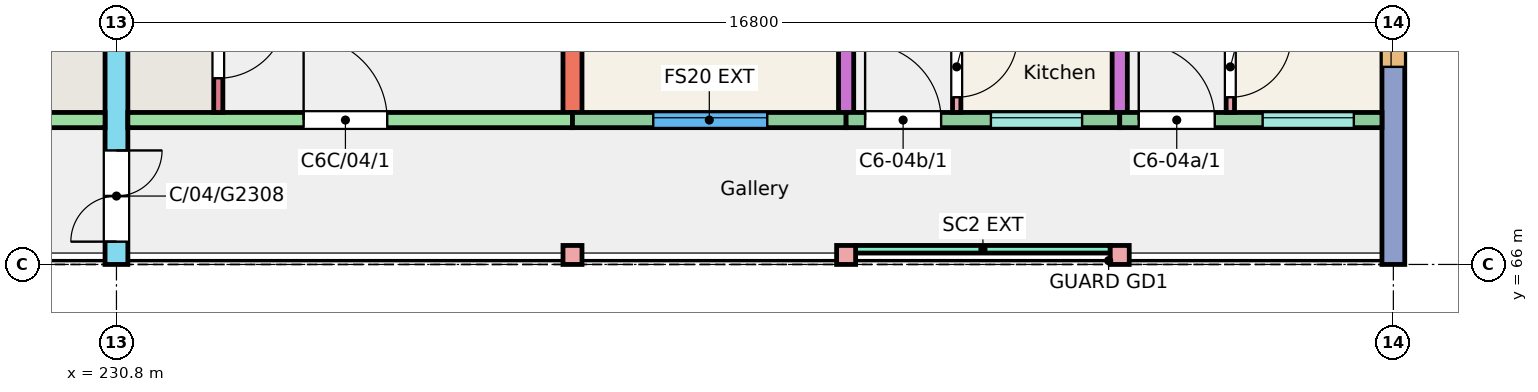
"""IFC4 building model, lengths in metres.
Left out: names, types, materials, properties, quantities, classifications, styles, units other than length and angle.
Written with IfcOpenShell. Run it as: python <this file> out.ifc"""

import sys

from ifc_helpers import new_model, si_unit, direction, frame, frame_2d, origin, origin_2d, place, context, subcontext, project, spatial, rectangle, extrude, element, fill, save


model = new_model("IFC4")
c1 = context("Model", 3, precision=1e-05, world=origin(), true_north=direction((0.0, 1.0)))
c2 = subcontext(c1, "Body", "Model", "MODEL_VIEW")
j1 = project(units=[si_unit("LENGTHUNIT", "METRE"), si_unit("PLANEANGLEUNIT", "RADIAN")], contexts=[c1])
p1 = place(None, origin())
s1 = spatial("IfcSite", under=j1, at=p1, CompositionType="ELEMENT")
p2 = place(p1, origin())
s2 = spatial("IfcBuilding", under=s1, at=p2, CompositionType="ELEMENT")
p3 = place(p2, frame((0.0, 0.0, 12.0)))
s3 = spatial("IfcBuildingStorey", under=s2, at=p3, CompositionType="ELEMENT", Elevation=12.0)
p4 = place(p3, frame((230.8, 66.0, 0.0), z_axis=(0.0, 0.0, 1.0), x_axis=(0.0, 1.0, 0.0)))
e1 = element("IfcWall", 1, at=p4, inside=s3, PredefinedType="SHEAR", context=c2, shape_type="SweptSolid", body=[
    extrude(rectangle(XDim=11.0, YDim=0.3, at=frame_2d((5.5, 0.0))), origin(), (0.0, 0.0, 1.0), 3.0),
])
p5 = place(p4, frame((0.3, 0.0, 0.0)))
e2 = element("IfcOpeningElement", 2, at=p5, cuts=e1, PredefinedType="OPENING", context=c2, shape_type="SweptSolid", body=[
    extrude(rectangle(XDim=1.2, YDim=2.1, at=frame_2d((0.6, 1.05))), frame((0.0, 0.16, 0.0), z_axis=(0.0, -1.0, 0.0), x_axis=(1.0, 0.0, 0.0)), (0.0, 0.0, 1.0), 0.32),
])
p6 = place(p3, frame((236.8, 68.0, 0.0), z_axis=(0.0, 0.0, 1.0), x_axis=(0.0, 1.0, 0.0)))
e3 = element("IfcWall", 3, at=p6, inside=s3, PredefinedType="SHEAR", context=c2, shape_type="SweptSolid", body=[
    extrude(rectangle(XDim=9.0, YDim=0.25, at=frame_2d((4.5, 0.0))), origin(), (0.0, 0.0, 1.0), 3.0),
])
p7 = place(p3, frame((240.4, 68.0, 0.0), z_axis=(0.0, 0.0, 1.0), x_axis=(0.0, 1.0, 0.0)))
e4 = element("IfcWall", 4, at=p7, inside=s3, PredefinedType="SHEAR", context=c2, shape_type="SweptSolid", body=[
    extrude(rectangle(XDim=9.0, YDim=0.2, at=frame_2d((4.5, 0.0))), origin(), (0.0, 0.0, 1.0), 3.0),
])
p8 = place(p7, frame((2.4, 0.0, 0.0)))
e5 = element("IfcOpeningElement", 5, at=p8, cuts=e4, PredefinedType="OPENING", context=c2, shape_type="SweptSolid", body=[
    extrude(rectangle(XDim=1.2, YDim=2.1, at=frame_2d((0.6, 1.05))), frame((0.0, 0.11, 0.0), z_axis=(0.0, -1.0, 0.0), x_axis=(1.0, 0.0, 0.0)), (0.0, 0.0, 1.0), 0.22),
])
p9 = place(p7, frame((6.4, 0.0, 0.0)))
e6 = element("IfcOpeningElement", 6, at=p9, cuts=e4, PredefinedType="OPENING", context=c2, shape_type="SweptSolid", body=[
    extrude(rectangle(XDim=1.2, YDim=2.1, at=frame_2d((0.6, 1.05))), frame((0.0, 0.11, 0.0), z_axis=(0.0, -1.0, 0.0), x_axis=(1.0, 0.0, 0.0)), (0.0, 0.0, 1.0), 0.22),
])
p10 = place(p3, frame((244.0, 68.0, 0.0), z_axis=(0.0, 0.0, 1.0), x_axis=(0.0, 1.0, 0.0)))
e7 = element("IfcWall", 7, at=p10, inside=s3, PredefinedType="SHEAR", context=c2, shape_type="SweptSolid", body=[
    extrude(rectangle(XDim=9.0, YDim=0.2, at=frame_2d((4.5, 0.0))), origin(), (0.0, 0.0, 1.0), 3.0),
])
p11 = place(p3, frame((247.6, 66.0, 0.0), z_axis=(0.0, 0.0, 1.0), x_axis=(0.0, 1.0, 0.0)))
e8 = element("IfcWall", 8, at=p11, inside=s3, PredefinedType="SHEAR", context=c2, shape_type="SweptSolid", body=[
    extrude(rectangle(XDim=11.0, YDim=0.3, at=frame_2d((5.5, 0.0))), origin(), (0.0, 0.0, 1.0), 3.0),
])
p12 = place(p11, frame((2.6, 0.0, 0.9)))
e9 = element("IfcOpeningElement", 9, at=p12, cuts=e8, PredefinedType="OPENING", context=c2, shape_type="SweptSolid", body=[
    extrude(rectangle(XDim=1.2, YDim=1.5, at=frame_2d((0.6, 0.75))), frame((0.0, 0.16, 0.0), z_axis=(0.0, -1.0, 0.0), x_axis=(1.0, 0.0, 0.0)), (0.0, 0.0, 1.0), 0.32),
])
p13 = place(p11, frame((8.005, 0.0, 0.9)))
e10 = element("IfcOpeningElement", 10, at=p13, cuts=e8, PredefinedType="OPENING", context=c2, shape_type="SweptSolid", body=[
    extrude(rectangle(XDim=1.8, YDim=1.5, at=frame_2d((0.9, 0.75))), frame((0.0, 0.16, 0.0), z_axis=(0.0, -1.0, 0.0), x_axis=(1.0, 0.0, 0.0)), (0.0, 0.0, 1.0), 0.32),
])
p14 = place(p3, frame((224.8, 67.9, 0.0), z_axis=(0.0, 0.0, 1.0), x_axis=(1.0, 0.0, 0.0)))
e11 = element("IfcWall", 11, at=p14, inside=s3, PredefinedType="SHEAR", context=c2, shape_type="SweptSolid", body=[
    extrude(rectangle(XDim=5.85, YDim=0.2, at=frame_2d((2.925, 0.0))), origin(), (0.0, 0.0, 1.0), 3.0),
])
p15 = place(p14, frame((2.438, 0.0, 0.0)))
e12 = element("IfcOpeningElement", 12, at=p15, cuts=e11, PredefinedType="OPENING", context=c2, shape_type="SweptSolid", body=[
    extrude(rectangle(XDim=1.1, YDim=2.1, at=frame_2d((0.55, 1.05))), frame((0.0, 0.11, 0.0), z_axis=(0.0, -1.0, 0.0), x_axis=(1.0, 0.0, 0.0)), (0.0, 0.0, 1.0), 0.22),
])
p16 = place(p3, frame((230.95, 67.9, 0.0), z_axis=(0.0, 0.0, 1.0), x_axis=(1.0, 0.0, 0.0)))
e13 = element("IfcWall", 13, at=p16, inside=s3, PredefinedType="SHEAR", context=c2, shape_type="SweptSolid", body=[
    extrude(rectangle(XDim=5.85, YDim=0.2, at=frame_2d((2.925, 0.0))), origin(), (0.0, 0.0, 1.0), 3.0),
])
p17 = place(p16, frame((2.312, 0.0, 0.0)))
e14 = element("IfcOpeningElement", 14, at=p17, cuts=e13, PredefinedType="OPENING", context=c2, shape_type="SweptSolid", body=[
    extrude(rectangle(XDim=1.1, YDim=2.1, at=frame_2d((0.55, 1.05))), frame((0.0, 0.11, 0.0), z_axis=(0.0, -1.0, 0.0), x_axis=(1.0, 0.0, 0.0)), (0.0, 0.0, 1.0), 0.22),
])
p18 = place(p3, frame((232.14, 68.0, 0.0), z_axis=(0.0, 0.0, 1.0), x_axis=(0.0, 1.0, 0.0)))
e15 = element("IfcWall", 15, at=p18, inside=s3, PredefinedType="SHEAR", context=c2, shape_type="SweptSolid", body=[
    extrude(rectangle(XDim=1.72, YDim=0.12, at=frame_2d((0.86, 0.0))), origin(), (0.0, 0.0, 1.0), 3.0),
])
p19 = place(p18, frame((0.45, 0.0, 0.0)))
e16 = element("IfcOpeningElement", 16, at=p19, cuts=e15, PredefinedType="OPENING", context=c2, shape_type="SweptSolid", body=[
    extrude(rectangle(XDim=0.9, YDim=2.1, at=frame_2d((0.45, 1.05))), frame((0.0, 0.07, 0.0), z_axis=(0.0, -1.0, 0.0), x_axis=(1.0, 0.0, 0.0)), (0.0, 0.0, 1.0), 0.14),
])
p20 = place(p3, frame((236.8, 67.9, 0.0), z_axis=(0.0, 0.0, 1.0), x_axis=(1.0, 0.0, 0.0)))
e17 = element("IfcWall", 17, at=p20, inside=s3, PredefinedType="SOLIDWALL", context=c2, shape_type="SweptSolid", body=[
    extrude(rectangle(XDim=3.6, YDim=0.2, at=frame_2d((1.8, 0.0))), origin(), (0.0, 0.0, 1.0), 3.0),
])
p21 = place(p20, frame((1.062, 0.0, 0.9)))
e18 = element("IfcOpeningElement", 18, at=p21, cuts=e17, PredefinedType="OPENING", context=c2, shape_type="SweptSolid", body=[
    extrude(rectangle(XDim=1.5, YDim=1.5, at=frame_2d((0.75, 0.75))), frame((0.0, 0.11, 0.0), z_axis=(0.0, -1.0, 0.0), x_axis=(1.0, 0.0, 0.0)), (0.0, 0.0, 1.0), 0.22),
])
p22 = place(p3, frame((240.4, 67.9, 0.0), z_axis=(0.0, 0.0, 1.0), x_axis=(1.0, 0.0, 0.0)))
e19 = element("IfcWall", 19, at=p22, inside=s3, PredefinedType="SOLIDWALL", context=c2, shape_type="SweptSolid", body=[
    extrude(rectangle(XDim=3.6, YDim=0.2, at=frame_2d((1.8, 0.0))), origin(), (0.0, 0.0, 1.0), 3.0),
])
p23 = place(p22, frame((1.905, 0.0, 1.1)))
e20 = element("IfcOpeningElement", 20, at=p23, cuts=e19, PredefinedType="OPENING", context=c2, shape_type="SweptSolid", body=[
    extrude(rectangle(XDim=1.2, YDim=1.3, at=frame_2d((0.6, 0.65))), frame((0.0, 0.11, 0.0), z_axis=(0.0, -1.0, 0.0), x_axis=(1.0, 0.0, 0.0)), (0.0, 0.0, 1.0), 0.22),
])
p24 = place(p22, frame((0.25, 0.0, 0.0)))
e21 = element("IfcOpeningElement", 21, at=p24, cuts=e19, PredefinedType="OPENING", context=c2, shape_type="SweptSolid", body=[
    extrude(rectangle(XDim=1.0, YDim=2.1, at=frame_2d((0.5, 1.05))), frame((0.0, 0.11, 0.0), z_axis=(0.0, -1.0, 0.0), x_axis=(1.0, 0.0, 0.0)), (0.0, 0.0, 1.0), 0.22),
])
p25 = place(p3, frame((244.0, 67.9, 0.0), z_axis=(0.0, 0.0, 1.0), x_axis=(1.0, 0.0, 0.0)))
e22 = element("IfcWall", 22, at=p25, inside=s3, PredefinedType="SOLIDWALL", context=c2, shape_type="SweptSolid", body=[
    extrude(rectangle(XDim=3.45, YDim=0.2, at=frame_2d((1.725, 0.0))), origin(), (0.0, 0.0, 1.0), 3.0),
])
p26 = place(p25, frame((1.88, 0.0, 1.1)))
e23 = element("IfcOpeningElement", 23, at=p26, cuts=e22, PredefinedType="OPENING", context=c2, shape_type="SweptSolid", body=[
    extrude(rectangle(XDim=1.2, YDim=1.3, at=frame_2d((0.6, 0.65))), frame((0.0, 0.11, 0.0), z_axis=(0.0, -1.0, 0.0), x_axis=(1.0, 0.0, 0.0)), (0.0, 0.0, 1.0), 0.22),
])
p27 = place(p25, frame((0.25, 0.0, 0.0)))
e24 = element("IfcOpeningElement", 24, at=p27, cuts=e22, PredefinedType="OPENING", context=c2, shape_type="SweptSolid", body=[
    extrude(rectangle(XDim=1.0, YDim=2.1, at=frame_2d((0.5, 1.05))), frame((0.0, 0.11, 0.0), z_axis=(0.0, -1.0, 0.0), x_axis=(1.0, 0.0, 0.0)), (0.0, 0.0, 1.0), 0.22),
])
for number, where, z_axis, x_axis in (
    (25, (236.8, 66.125, 0.0), (0.0, 0.0, 1.0), (1.0, 0.0, 0.0)),
    (26, (240.4, 66.125, 0.0), (0.0, 0.0, 1.0), (1.0, 0.0, 0.0)),
    (27, (244.0, 66.125, 0.0), (0.0, 0.0, 1.0), (1.0, 0.0, 0.0)),
):
    element("IfcColumn", number, at=place(p3, frame(where, z_axis=z_axis, x_axis=x_axis)), inside=s3, PredefinedType="COLUMN", context=c2, shape_type="SweptSolid", body=[
        extrude(rectangle(XDim=0.25, YDim=0.25, at=origin_2d()), origin(), (0.0, 0.0, 1.0), 3.0),
    ])
p28 = place(p3, frame((240.525, 66.2, 0.0), z_axis=(0.0, 0.0, 1.0), x_axis=(1.0, 0.0, 0.0)))
e28 = element("IfcWall", 28, at=p28, inside=s3, PredefinedType="SOLIDWALL", context=c2, shape_type="SweptSolid", body=[
    extrude(rectangle(XDim=3.35, YDim=0.1, at=frame_2d((1.675, 0.0))), origin(), (0.0, 0.0, 1.0), 2.45),
])
p29 = place(p3, frame((245.455, 68.0, 0.0), z_axis=(0.0, 0.0, 1.0), x_axis=(0.0, 1.0, 0.0)))
e29 = element("IfcWall", 29, at=p29, inside=s3, PredefinedType="PARTITIONING", context=c2, shape_type="SweptSolid", body=[
    extrude(rectangle(XDim=4.7, YDim=0.11, at=frame_2d((2.35, 0.0))), origin(), (0.0, 0.0, 1.0), 2.8),
])
p30 = place(p29, frame((0.2, 0.0, 0.0)))
e30 = element("IfcOpeningElement", 30, at=p30, cuts=e29, PredefinedType="OPENING", context=c2, shape_type="SweptSolid", body=[
    extrude(rectangle(XDim=0.8, YDim=2.1, at=frame_2d((0.4, 1.05))), frame((0.0, 0.065, 0.0), z_axis=(0.0, -1.0, 0.0), x_axis=(1.0, 0.0, 0.0)), (0.0, 0.0, 1.0), 0.13),
])
p31 = place(p29, frame((3.75, 0.0, 0.0)))
e31 = element("IfcOpeningElement", 31, at=p31, cuts=e29, PredefinedType="OPENING", context=c2, shape_type="SweptSolid", body=[
    extrude(rectangle(XDim=0.8, YDim=2.1, at=frame_2d((0.4, 1.05))), frame((0.0, 0.065, 0.0), z_axis=(0.0, -1.0, 0.0), x_axis=(1.0, 0.0, 0.0)), (0.0, 0.0, 1.0), 0.13),
])
p32 = place(p3, frame((241.855, 68.0, 0.0), z_axis=(0.0, 0.0, 1.0), x_axis=(0.0, 1.0, 0.0)))
e32 = element("IfcWall", 32, at=p32, inside=s3, PredefinedType="PARTITIONING", context=c2, shape_type="SweptSolid", body=[
    extrude(rectangle(XDim=4.7, YDim=0.11, at=frame_2d((2.35, 0.0))), origin(), (0.0, 0.0, 1.0), 2.8),
])
p33 = place(p32, frame((0.2, 0.0, 0.0)))
e33 = element("IfcOpeningElement", 33, at=p33, cuts=e32, PredefinedType="OPENING", context=c2, shape_type="SweptSolid", body=[
    extrude(rectangle(XDim=0.8, YDim=2.1, at=frame_2d((0.4, 1.05))), frame((0.0, 0.065, 0.0), z_axis=(0.0, -1.0, 0.0), x_axis=(1.0, 0.0, 0.0)), (0.0, 0.0, 1.0), 0.13),
])
p34 = place(p32, frame((3.75, 0.0, 0.0)))
e34 = element("IfcOpeningElement", 34, at=p34, cuts=e32, PredefinedType="OPENING", context=c2, shape_type="SweptSolid", body=[
    extrude(rectangle(XDim=0.8, YDim=2.1, at=frame_2d((0.4, 1.05))), frame((0.0, 0.065, 0.0), z_axis=(0.0, -1.0, 0.0), x_axis=(1.0, 0.0, 0.0)), (0.0, 0.0, 1.0), 0.13),
])
p35 = place(p26, origin())
e35 = element("IfcWindow", 35, at=p35, inside=s3, PartitioningType="SINGLE_PANEL", PredefinedType="WINDOW", context=c2, shape_type="SweptSolid", body=[
    extrude(rectangle(XDim=1.2, YDim=1.3, at=frame_2d((0.6, 0.65))), frame((0.0, 0.06, 0.0), z_axis=(0.0, -1.0, 0.0), x_axis=(1.0, 0.0, 0.0)), (0.0, 0.0, 1.0), 0.06),
])
fill(e23, e35)
p36 = place(p12, origin())
e36 = element("IfcWindow", 36, at=p36, inside=s3, PartitioningType="SINGLE_PANEL", PredefinedType="WINDOW", context=c2, shape_type="SweptSolid", body=[
    extrude(rectangle(XDim=1.2, YDim=1.5, at=frame_2d((0.6, 0.75))), frame((0.0, 0.06, 0.0), z_axis=(0.0, -1.0, 0.0), x_axis=(1.0, 0.0, 0.0)), (0.0, 0.0, 1.0), 0.06),
])
fill(e9, e36)
p37 = place(p21, origin())
e37 = element("IfcWindow", 37, at=p37, inside=s3, PartitioningType="SINGLE_PANEL", PredefinedType="WINDOW", context=c2, shape_type="SweptSolid", body=[
    extrude(rectangle(XDim=1.5, YDim=1.5, at=frame_2d((0.75, 0.75))), frame((0.0, 0.06, 0.0), z_axis=(0.0, -1.0, 0.0), x_axis=(1.0, 0.0, 0.0)), (0.0, 0.0, 1.0), 0.06),
])
fill(e18, e37)
p38 = place(p23, origin())
e38 = element("IfcWindow", 38, at=p38, inside=s3, PartitioningType="SINGLE_PANEL", PredefinedType="WINDOW", context=c2, shape_type="SweptSolid", body=[
    extrude(rectangle(XDim=1.2, YDim=1.3, at=frame_2d((0.6, 0.65))), frame((0.0, 0.06, 0.0), z_axis=(0.0, -1.0, 0.0), x_axis=(1.0, 0.0, 0.0)), (0.0, 0.0, 1.0), 0.06),
])
fill(e20, e38)
p39 = place(p27, origin())
e39 = element("IfcDoor", 39, at=p39, inside=s3, OperationType="SINGLE_SWING_LEFT", PredefinedType="DOOR", context=c2, shape_type="SweptSolid", body=[
    extrude(rectangle(XDim=1.0, YDim=2.1, at=frame_2d((0.5, 1.05))), frame((0.0, 0.025, 0.0), z_axis=(0.0, -1.0, 0.0), x_axis=(1.0, 0.0, 0.0)), (0.0, 0.0, 1.0), 0.05),
])
fill(e24, e39)
p40 = place(p30, origin())
e40 = element("IfcDoor", 40, at=p40, inside=s3, OperationType="SINGLE_SWING_RIGHT", PredefinedType="DOOR", context=c2, shape_type="SweptSolid", body=[
    extrude(rectangle(XDim=0.8, YDim=2.1, at=frame_2d((0.4, 1.05))), frame((0.0, 0.025, 0.0), z_axis=(0.0, -1.0, 0.0), x_axis=(1.0, 0.0, 0.0)), (0.0, 0.0, 1.0), 0.05),
])
fill(e30, e40)
p41 = place(p24, origin())
e41 = element("IfcDoor", 41, at=p41, inside=s3, OperationType="SINGLE_SWING_LEFT", PredefinedType="DOOR", context=c2, shape_type="SweptSolid", body=[
    extrude(rectangle(XDim=1.0, YDim=2.1, at=frame_2d((0.5, 1.05))), frame((0.0, 0.025, 0.0), z_axis=(0.0, -1.0, 0.0), x_axis=(1.0, 0.0, 0.0)), (0.0, 0.0, 1.0), 0.05),
])
fill(e21, e41)
p42 = place(p33, origin())
e42 = element("IfcDoor", 42, at=p42, inside=s3, OperationType="SINGLE_SWING_RIGHT", PredefinedType="DOOR", context=c2, shape_type="SweptSolid", body=[
    extrude(rectangle(XDim=0.8, YDim=2.1, at=frame_2d((0.4, 1.05))), frame((0.0, 0.025, 0.0), z_axis=(0.0, -1.0, 0.0), x_axis=(1.0, 0.0, 0.0)), (0.0, 0.0, 1.0), 0.05),
])
fill(e33, e42)
p43 = place(p17, origin())
e43 = element("IfcDoor", 43, at=p43, inside=s3, OperationType="SINGLE_SWING_LEFT", PredefinedType="DOOR", context=c2, shape_type="SweptSolid", body=[
    extrude(rectangle(XDim=1.1, YDim=2.1, at=frame_2d((0.55, 1.05))), frame((0.0, 0.025, 0.0), z_axis=(0.0, -1.0, 0.0), x_axis=(1.0, 0.0, 0.0)), (0.0, 0.0, 1.0), 0.05),
])
fill(e14, e43)
p44 = place(p19, origin())
e44 = element("IfcDoor", 44, at=p44, inside=s3, OperationType="SINGLE_SWING_RIGHT", PredefinedType="DOOR", context=c2, shape_type="SweptSolid", body=[
    extrude(rectangle(XDim=0.9, YDim=2.1, at=frame_2d((0.45, 1.05))), frame((0.0, 0.025, 0.0), z_axis=(0.0, -1.0, 0.0), x_axis=(1.0, 0.0, 0.0)), (0.0, 0.0, 1.0), 0.05),
])
fill(e16, e44)
p45 = place(p5, origin())
e45 = element("IfcDoor", 45, at=p45, inside=s3, OperationType="DOUBLE_DOOR_SINGLE_SWING", PredefinedType="DOOR", context=c2, shape_type="SweptSolid", body=[
    extrude(rectangle(XDim=1.2, YDim=2.1, at=frame_2d((0.6, 1.05))), frame((0.0, 0.025, 0.0), z_axis=(0.0, -1.0, 0.0), x_axis=(1.0, 0.0, 0.0)), (0.0, 0.0, 1.0), 0.05),
])
fill(e2, e45)
save(model, sys.argv[1])
